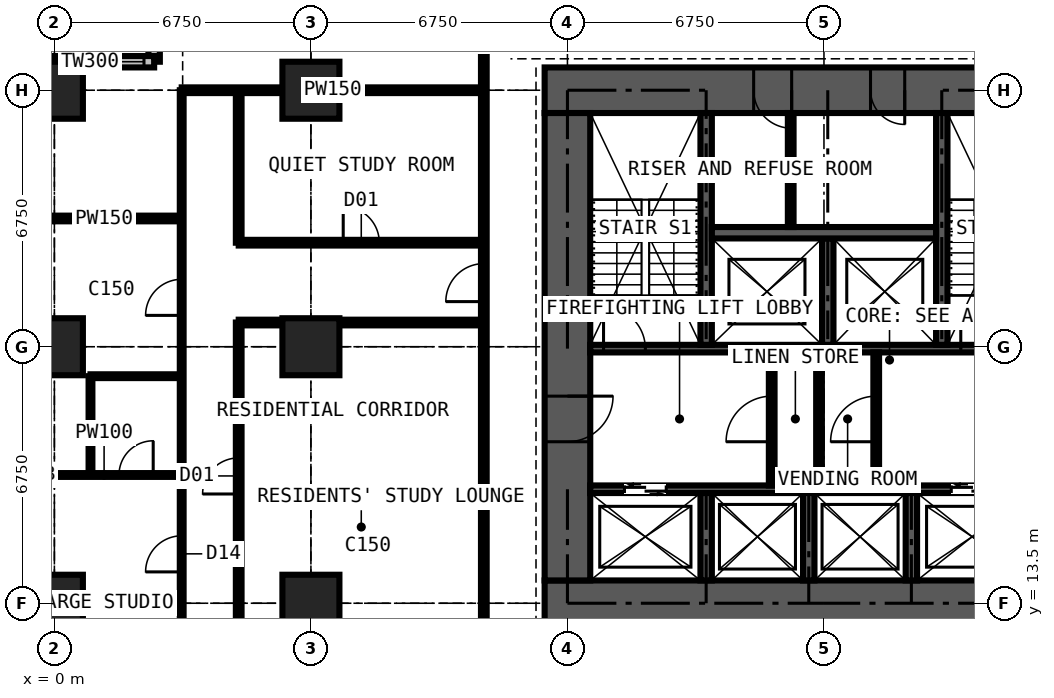
"""IFC4 building model, lengths in metres.
Left out: names, types, materials, properties, quantities, classifications, styles, units other than length and angle.
Written with IfcOpenShell. Run it as: python <this file> out.ifc"""

import sys

from ifc_helpers import new_model, si_unit, direction, frame, frame_2d, origin, origin_2d, place, context, subcontext, project, spatial, rectangle, extrude, element, fill, save


model = new_model("IFC4")
c1 = context("Model", 3, precision=1e-05, world=origin(), true_north=direction((0.0, 1.0)))
c2 = subcontext(c1, "Body", "Model", "MODEL_VIEW")
j1 = project(units=[si_unit("LENGTHUNIT", "METRE"), si_unit("PLANEANGLEUNIT", "RADIAN")], contexts=[c1])
p1 = place(None, origin())
s1 = spatial("IfcSite", under=j1, at=p1, CompositionType="ELEMENT")
p2 = place(p1, origin())
s2 = spatial("IfcBuilding", under=s1, at=p2, CompositionType="ELEMENT")
p3 = place(p2, frame((0.0, 0.0, 119.7)))
s3 = spatial("IfcBuildingStorey", under=s2, at=p3, CompositionType="ELEMENT", Elevation=119.7)
for number, where, z_axis, x_axis in (
    (1, (0.0, 13.5, 0.0), (0.0, 0.0, 1.0), (1.0, 0.0, 0.0)),
    (2, (0.0, 20.25, 0.0), (0.0, 0.0, 1.0), (1.0, 0.0, 0.0)),
    (3, (0.0, 27.0, 0.0), (0.0, 0.0, 1.0), (1.0, 0.0, 0.0)),
    (4, (6.75, 13.5, 0.0), (0.0, 0.0, 1.0), (1.0, 0.0, 0.0)),
    (5, (6.75, 20.25, 0.0), (0.0, 0.0, 1.0), (1.0, 0.0, 0.0)),
    (6, (6.75, 27.0, 0.0), (0.0, 0.0, 1.0), (1.0, 0.0, 0.0)),
):
    element("IfcColumn", number, at=place(p3, frame(where, z_axis=z_axis, x_axis=x_axis)), inside=s3, PredefinedType="COLUMN", context=c2, shape_type="SweptSolid", body=[
        extrude(rectangle(XDim=1.5, YDim=1.5, at=origin_2d()), origin(), (0.0, 0.0, 1.0), 3.6),
    ])
p4 = place(p3, frame((12.9, 13.5, 0.0), z_axis=(0.0, 0.0, 1.0), x_axis=(1.0, 0.0, 0.0)))
e7 = element("IfcWall", 7, at=p4, inside=s3, PredefinedType="SHEAR", context=c2, shape_type="SweptSolid", body=[
    extrude(rectangle(XDim=14.7, YDim=1.2, at=frame_2d((7.35, 0.0))), origin(), (0.0, 0.0, 1.0), 3.6),
])
p5 = place(p3, frame((27.6, 27.0, 0.0), z_axis=(0.0, 0.0, 1.0), x_axis=(-1.0, 0.0, 0.0)))
e8 = element("IfcWall", 8, at=p5, inside=s3, PredefinedType="SHEAR", context=c2, shape_type="SweptSolid", body=[
    extrude(rectangle(XDim=14.7, YDim=1.2, at=frame_2d((7.35, 0.0))), origin(), (0.0, 0.0, 1.0), 3.6),
])
p6 = place(p5, frame((5.225, 0.0, 0.0)))
e9 = element("IfcOpeningElement", 9, at=p6, cuts=e8, PredefinedType="OPENING", context=c2, shape_type="SweptSolid", body=[
    extrude(rectangle(XDim=0.9, YDim=2.2, at=frame_2d((0.45, 1.1))), frame((0.0, 0.61, 0.0), z_axis=(0.0, -1.0, 0.0), x_axis=(1.0, 0.0, 0.0)), (0.0, 0.0, 1.0), 1.22),
])
p7 = place(p5, frame((8.2, 0.0, 0.0)))
e10 = element("IfcOpeningElement", 10, at=p7, cuts=e8, PredefinedType="OPENING", context=c2, shape_type="SweptSolid", body=[
    extrude(rectangle(XDim=1.0, YDim=2.2, at=frame_2d((0.5, 1.1))), frame((0.0, 0.61, 0.0), z_axis=(0.0, -1.0, 0.0), x_axis=(1.0, 0.0, 0.0)), (0.0, 0.0, 1.0), 1.22),
])
p8 = place(p3, frame((13.5, 26.4, 0.0), z_axis=(0.0, 0.0, 1.0), x_axis=(0.0, -1.0, 0.0)))
e11 = element("IfcWall", 11, at=p8, inside=s3, PredefinedType="SHEAR", context=c2, shape_type="SweptSolid", body=[
    extrude(rectangle(XDim=12.3, YDim=1.2, at=frame_2d((6.15, 0.0))), origin(), (0.0, 0.0, 1.0), 3.6),
])
p9 = place(p8, frame((7.45, 0.0, 0.0)))
e12 = element("IfcOpeningElement", 12, at=p9, cuts=e11, PredefinedType="OPENING", context=c2, shape_type="SweptSolid", body=[
    extrude(rectangle(XDim=1.2, YDim=2.2, at=frame_2d((0.6, 1.1))), frame((0.0, 0.61, 0.0), z_axis=(0.0, -1.0, 0.0), x_axis=(1.0, 0.0, 0.0)), (0.0, 0.0, 1.0), 1.22),
])
p10 = place(p3, frame((2.625, 31.125, 0.0), z_axis=(0.0, 0.0, 1.0), x_axis=(0.0, -1.0, 0.0)))
e13 = element("IfcWall", 13, at=p10, inside=s3, PredefinedType="SOLIDWALL", context=c2, shape_type="SweptSolid", body=[
    extrude(rectangle(XDim=3.375, YDim=0.3, at=frame_2d((1.688, 0.0))), origin(), (0.0, 0.0, 1.0), 3.375),
])
p11 = place(p10, frame((0.788, 0.0, 0.6)))
e14 = element("IfcOpeningElement", 14, at=p11, cuts=e13, PredefinedType="OPENING", context=c2, shape_type="SweptSolid", body=[
    extrude(rectangle(XDim=1.8, YDim=2.1, at=frame_2d((0.9, 1.05))), frame((0.0, 0.16, 0.0), z_axis=(0.0, -1.0, 0.0), x_axis=(1.0, 0.0, 0.0)), (0.0, 0.0, 1.0), 0.32),
])
p12 = place(p3, frame((2.625, 27.75, 0.0), z_axis=(0.0, 0.0, 1.0), x_axis=(-1.0, 0.0, 0.0)))
e15 = element("IfcWall", 15, at=p12, inside=s3, PredefinedType="SOLIDWALL", context=c2, shape_type="SweptSolid", body=[
    extrude(rectangle(XDim=3.375, YDim=0.3, at=frame_2d((1.688, 0.0))), origin(), (0.0, 0.0, 1.0), 3.375),
])
p13 = place(p12, frame((0.268, 0.0, 0.9)))
e16 = element("IfcOpeningElement", 16, at=p13, cuts=e15, PredefinedType="OPENING", context=c2, shape_type="SweptSolid", body=[
    extrude(rectangle(XDim=1.5, YDim=1.8, at=frame_2d((0.75, 0.9))), frame((0.0, 0.16, 0.0), z_axis=(0.0, -1.0, 0.0), x_axis=(1.0, 0.0, 0.0)), (0.0, 0.0, 1.0), 0.32),
])
p14 = place(p3, frame((14.1, 16.5, 0.0), z_axis=(0.0, 0.0, 1.0), x_axis=(1.0, 0.0, 0.0)))
e17 = element("IfcWall", 17, at=p14, inside=s3, PredefinedType="SHEAR", context=c2, shape_type="SweptSolid", body=[
    extrude(rectangle(XDim=12.3, YDim=0.2, at=frame_2d((6.15, 0.0))), origin(), (0.0, 0.0, 1.0), 3.6),
])
p15 = place(p14, frame((0.9, 0.0, 0.0)))
e18 = element("IfcOpeningElement", 18, at=p15, cuts=e17, PredefinedType="OPENING", context=c2, shape_type="SweptSolid", body=[
    extrude(rectangle(XDim=1.1, YDim=2.2, at=frame_2d((0.55, 1.1))), frame((0.0, 0.11, 0.0), z_axis=(0.0, -1.0, 0.0), x_axis=(1.0, 0.0, 0.0)), (0.0, 0.0, 1.0), 0.22),
])
p16 = place(p14, frame((9.5, 0.0, 0.0)))
e19 = element("IfcOpeningElement", 19, at=p16, cuts=e17, PredefinedType="OPENING", context=c2, shape_type="SweptSolid", body=[
    extrude(rectangle(XDim=1.1, YDim=2.2, at=frame_2d((0.55, 1.1))), frame((0.0, 0.11, 0.0), z_axis=(0.0, -1.0, 0.0), x_axis=(1.0, 0.0, 0.0)), (0.0, 0.0, 1.0), 0.22),
])
p17 = place(p3, frame((14.1, 20.2, 0.0), z_axis=(0.0, 0.0, 1.0), x_axis=(1.0, 0.0, 0.0)))
e20 = element("IfcWall", 20, at=p17, inside=s3, PredefinedType="SHEAR", context=c2, shape_type="SweptSolid", body=[
    extrude(rectangle(XDim=12.3, YDim=0.2, at=frame_2d((6.15, 0.0))), origin(), (0.0, 0.0, 1.0), 3.6),
])
p18 = place(p17, frame((0.35, 0.0, 0.0)))
e21 = element("IfcOpeningElement", 21, at=p18, cuts=e20, PredefinedType="OPENING", context=c2, shape_type="SweptSolid", body=[
    extrude(rectangle(XDim=1.1, YDim=2.2, at=frame_2d((0.55, 1.1))), frame((0.0, 0.11, 0.0), z_axis=(0.0, -1.0, 0.0), x_axis=(1.0, 0.0, 0.0)), (0.0, 0.0, 1.0), 0.22),
])
p19 = place(p17, frame((9.75, 0.0, 0.0)))
e22 = element("IfcOpeningElement", 22, at=p19, cuts=e20, PredefinedType="OPENING", context=c2, shape_type="SweptSolid", body=[
    extrude(rectangle(XDim=1.1, YDim=2.2, at=frame_2d((0.55, 1.1))), frame((0.0, 0.11, 0.0), z_axis=(0.0, -1.0, 0.0), x_axis=(1.0, 0.0, 0.0)), (0.0, 0.0, 1.0), 0.22),
])
for number, where, z_axis, x_axis in (
    (23, (17.15, 20.3, 0.0), (0.0, 0.0, 1.0), (0.0, 1.0, 0.0)),
    (24, (23.35, 20.3, 0.0), (0.0, 0.0, 1.0), (0.0, 1.0, 0.0)),
):
    element("IfcWall", number, at=place(p3, frame(where, z_axis=z_axis, x_axis=x_axis)), inside=s3, PredefinedType="SHEAR", context=c2, shape_type="SweptSolid", body=[
        extrude(rectangle(XDim=6.1, YDim=0.3, at=frame_2d((3.05, 0.0))), origin(), (0.0, 0.0, 1.0), 3.6),
    ])
p20 = place(p3, frame((20.35, 20.3, 0.0), z_axis=(0.0, 0.0, 1.0), x_axis=(0.0, 1.0, 0.0)))
e25 = element("IfcWall", 25, at=p20, inside=s3, PredefinedType="SHEAR", context=c2, shape_type="SweptSolid", body=[
    extrude(rectangle(XDim=2.8, YDim=0.3, at=frame_2d((1.4, 0.0))), origin(), (0.0, 0.0, 1.0), 3.6),
])
p21 = place(p3, frame((17.3, 23.25, 0.0), z_axis=(0.0, 0.0, 1.0), x_axis=(1.0, 0.0, 0.0)))
e26 = element("IfcWall", 26, at=p21, inside=s3, PredefinedType="SHEAR", context=c2, shape_type="SweptSolid", body=[
    extrude(rectangle(XDim=5.9, YDim=0.3, at=frame_2d((2.95, 0.0))), origin(), (0.0, 0.0, 1.0), 3.6),
])
for number, where, z_axis, x_axis in (
    (27, (17.15, 14.1, 0.0), (0.0, 0.0, 1.0), (0.0, 1.0, 0.0)),
    (28, (19.85, 14.1, 0.0), (0.0, 0.0, 1.0), (0.0, 1.0, 0.0)),
    (29, (22.55, 14.1, 0.0), (0.0, 0.0, 1.0), (0.0, 1.0, 0.0)),
):
    element("IfcWall", number, at=place(p3, frame(where, z_axis=z_axis, x_axis=x_axis)), inside=s3, PredefinedType="SHEAR", context=c2, shape_type="SweptSolid", body=[
        extrude(rectangle(XDim=2.3, YDim=0.3, at=frame_2d((1.15, 0.0))), origin(), (0.0, 0.0, 1.0), 3.6),
    ])
p22 = place(p3, frame((18.875, 16.6, 0.0), z_axis=(0.0, 0.0, 1.0), x_axis=(0.0, 1.0, 0.0)))
e30 = element("IfcWall", 30, at=p22, inside=s3, PredefinedType="PARTITIONING", context=c2, shape_type="SweptSolid", body=[
    extrude(rectangle(XDim=3.5, YDim=0.15, at=frame_2d((1.75, 0.0))), origin(), (0.0, 0.0, 1.0), 3.375),
])
p23 = place(p22, frame((1.15, 0.0, 0.0)))
e31 = element("IfcOpeningElement", 31, at=p23, cuts=e30, PredefinedType="OPENING", context=c2, shape_type="SweptSolid", body=[
    extrude(rectangle(XDim=1.2, YDim=2.2, at=frame_2d((0.6, 1.1))), frame((0.0, 0.085, 0.0), z_axis=(0.0, -1.0, 0.0), x_axis=(1.0, 0.0, 0.0)), (0.0, 0.0, 1.0), 0.17),
])
p24 = place(p3, frame((21.625, 16.6, 0.0), z_axis=(0.0, 0.0, 1.0), x_axis=(0.0, 1.0, 0.0)))
e32 = element("IfcWall", 32, at=p24, inside=s3, PredefinedType="PARTITIONING", context=c2, shape_type="SweptSolid", body=[
    extrude(rectangle(XDim=3.5, YDim=0.15, at=frame_2d((1.75, 0.0))), origin(), (0.0, 0.0, 1.0), 3.375),
])
p25 = place(p24, frame((1.15, 0.0, 0.0)))
e33 = element("IfcOpeningElement", 33, at=p25, cuts=e32, PredefinedType="OPENING", context=c2, shape_type="SweptSolid", body=[
    extrude(rectangle(XDim=1.2, YDim=2.2, at=frame_2d((0.6, 1.1))), frame((0.0, 0.085, 0.0), z_axis=(0.0, -1.0, 0.0), x_axis=(1.0, 0.0, 0.0)), (0.0, 0.0, 1.0), 0.17),
])
p26 = place(p3, frame((20.12, 16.6, 0.0), z_axis=(0.0, 0.0, 1.0), x_axis=(0.0, 1.0, 0.0)))
e34 = element("IfcWall", 34, at=p26, inside=s3, PredefinedType="PARTITIONING", context=c2, shape_type="SweptSolid", body=[
    extrude(rectangle(XDim=3.5, YDim=0.15, at=frame_2d((1.75, 0.0))), origin(), (0.0, 0.0, 1.0), 3.375),
])
p27 = place(p3, frame((19.375, 23.4, 0.0), z_axis=(0.0, 0.0, 1.0), x_axis=(0.0, 1.0, 0.0)))
e35 = element("IfcWall", 35, at=p27, inside=s3, PredefinedType="PARTITIONING", context=c2, shape_type="SweptSolid", body=[
    extrude(rectangle(XDim=3.0, YDim=0.15, at=frame_2d((1.5, 0.0))), origin(), (0.0, 0.0, 1.0), 3.375),
])
p28 = place(p3, frame((-0.734, 16.875, 0.0), z_axis=(0.0, 0.0, 1.0), x_axis=(1.0, 0.0, 0.0)))
e36 = element("IfcWall", 36, at=p28, inside=s3, PredefinedType="PARTITIONING", context=c2, shape_type="SweptSolid", body=[
    extrude(rectangle(XDim=4.084, YDim=0.1, at=frame_2d((2.042, 0.0))), origin(), (0.0, 0.0, 1.0), 3.375),
])
p29 = place(p28, frame((2.434, 0.0, 0.0)))
e37 = element("IfcOpeningElement", 37, at=p29, cuts=e36, PredefinedType="OPENING", context=c2, shape_type="SweptSolid", body=[
    extrude(rectangle(XDim=0.9, YDim=2.2, at=frame_2d((0.45, 1.1))), frame((0.0, 0.06, 0.0), z_axis=(0.0, -1.0, 0.0), x_axis=(1.0, 0.0, 0.0)), (0.0, 0.0, 1.0), 0.12),
])
p30 = place(p3, frame((-0.734, 23.625, 0.0), z_axis=(0.0, 0.0, 1.0), x_axis=(1.0, 0.0, 0.0)))
e38 = element("IfcWall", 38, at=p30, inside=s3, PredefinedType="PARTITIONING", context=c2, shape_type="SweptSolid", body=[
    extrude(rectangle(XDim=4.084, YDim=0.15, at=frame_2d((2.042, 0.0))), origin(), (0.0, 0.0, 1.0), 3.375),
])
p31 = place(p3, frame((0.95, 16.875, 0.0), z_axis=(0.0, 0.0, 1.0), x_axis=(0.0, 1.0, 0.0)))
e39 = element("IfcWall", 39, at=p31, inside=s3, PredefinedType="PARTITIONING", context=c2, shape_type="SweptSolid", body=[
    extrude(rectangle(XDim=2.6, YDim=0.1, at=frame_2d((1.3, 0.0))), origin(), (0.0, 0.0, 1.0), 3.375),
])
p32 = place(p3, frame((0.95, 19.475, 0.0), z_axis=(0.0, 0.0, 1.0), x_axis=(1.0, 0.0, 0.0)))
e40 = element("IfcWall", 40, at=p32, inside=s3, PredefinedType="PARTITIONING", context=c2, shape_type="SweptSolid", body=[
    extrude(rectangle(XDim=2.4, YDim=0.1, at=frame_2d((1.2, 0.0))), origin(), (0.0, 0.0, 1.0), 3.375),
])
p33 = place(p3, frame((3.35, 10.125, 0.0), z_axis=(0.0, 0.0, 1.0), x_axis=(0.0, 1.0, 0.0)))
e41 = element("IfcWall", 41, at=p33, inside=s3, PredefinedType="PARTITIONING", context=c2, shape_type="SweptSolid", body=[
    extrude(rectangle(XDim=16.875, YDim=0.1, at=frame_2d((8.438, 0.0))), origin(), (0.0, 0.0, 1.0), 3.375),
])
p34 = place(p33, frame((4.2, 0.0, 0.0)))
e42 = element("IfcOpeningElement", 42, at=p34, cuts=e41, PredefinedType="OPENING", context=c2, shape_type="SweptSolid", body=[
    extrude(rectangle(XDim=0.95, YDim=2.2, at=frame_2d((0.475, 1.1))), frame((0.0, 0.06, 0.0), z_axis=(0.0, -1.0, 0.0), x_axis=(1.0, 0.0, 0.0)), (0.0, 0.0, 1.0), 0.12),
])
p35 = place(p33, frame((10.95, 0.0, 0.0)))
e43 = element("IfcOpeningElement", 43, at=p35, cuts=e41, PredefinedType="OPENING", context=c2, shape_type="SweptSolid", body=[
    extrude(rectangle(XDim=0.95, YDim=2.2, at=frame_2d((0.475, 1.1))), frame((0.0, 0.06, 0.0), z_axis=(0.0, -1.0, 0.0), x_axis=(1.0, 0.0, 0.0)), (0.0, 0.0, 1.0), 0.12),
])
p36 = place(p3, frame((3.35, 27.0, 0.0), z_axis=(0.0, 0.0, 1.0), x_axis=(1.0, 0.0, 0.0)))
e44 = element("IfcWall", 44, at=p36, inside=s3, PredefinedType="PARTITIONING", context=c2, shape_type="SweptSolid", body=[
    extrude(rectangle(XDim=7.95, YDim=0.15, at=frame_2d((3.975, 0.0))), origin(), (0.0, 0.0, 1.0), 2.806),
])
p37 = place(p3, frame((4.85, 12.775, 0.0), z_axis=(0.0, 0.0, 1.0), x_axis=(0.0, 1.0, 0.0)))
e45 = element("IfcWall", 45, at=p37, inside=s3, PredefinedType="PARTITIONING", context=c2, shape_type="SweptSolid", body=[
    extrude(rectangle(XDim=8.113, YDim=0.15, at=frame_2d((4.056, 0.0))), origin(), (0.0, 0.0, 1.0), 3.375),
])
p38 = place(p37, frame((3.6, 0.0, 0.0)))
e46 = element("IfcOpeningElement", 46, at=p38, cuts=e45, PredefinedType="OPENING", context=c2, shape_type="SweptSolid", body=[
    extrude(rectangle(XDim=0.95, YDim=2.2, at=frame_2d((0.475, 1.1))), frame((0.0, 0.085, 0.0), z_axis=(0.0, -1.0, 0.0), x_axis=(1.0, 0.0, 0.0)), (0.0, 0.0, 1.0), 0.17),
])
p39 = place(p3, frame((4.85, 20.887, 0.0), z_axis=(0.0, 0.0, 1.0), x_axis=(1.0, 0.0, 0.0)))
e47 = element("IfcWall", 47, at=p39, inside=s3, PredefinedType="PARTITIONING", context=c2, shape_type="SweptSolid", body=[
    extrude(rectangle(XDim=6.45, YDim=0.15, at=frame_2d((3.225, 0.0))), origin(), (0.0, 0.0, 1.0), 3.375),
])
p40 = place(p3, frame((4.85, 22.988, 0.0), z_axis=(0.0, 0.0, 1.0), x_axis=(0.0, 1.0, 0.0)))
e48 = element("IfcWall", 48, at=p40, inside=s3, PredefinedType="PARTITIONING", context=c2, shape_type="SweptSolid", body=[
    extrude(rectangle(XDim=4.012, YDim=0.15, at=frame_2d((2.006, 0.0))), origin(), (0.0, 0.0, 1.0), 3.375),
])
p41 = place(p3, frame((4.85, 22.988, 0.0), z_axis=(0.0, 0.0, 1.0), x_axis=(1.0, 0.0, 0.0)))
e49 = element("IfcWall", 49, at=p41, inside=s3, PredefinedType="PARTITIONING", context=c2, shape_type="SweptSolid", body=[
    extrude(rectangle(XDim=6.45, YDim=0.15, at=frame_2d((3.225, 0.0))), origin(), (0.0, 0.0, 1.0), 3.375),
])
p42 = place(p41, frame((2.75, 0.0, 0.0)))
e50 = element("IfcOpeningElement", 50, at=p42, cuts=e49, PredefinedType="OPENING", context=c2, shape_type="SweptSolid", body=[
    extrude(rectangle(XDim=0.95, YDim=2.2, at=frame_2d((0.475, 1.1))), frame((0.0, 0.085, 0.0), z_axis=(0.0, -1.0, 0.0), x_axis=(1.0, 0.0, 0.0)), (0.0, 0.0, 1.0), 0.17),
])
p43 = place(p3, frame((11.3, 11.3, 0.0), z_axis=(0.0, 0.0, 1.0), x_axis=(0.0, 1.0, 0.0)))
e51 = element("IfcWall", 51, at=p43, inside=s3, PredefinedType="PARTITIONING", context=c2, shape_type="SweptSolid", body=[
    extrude(rectangle(XDim=19.3, YDim=0.15, at=frame_2d((9.65, 0.0))), origin(), (0.0, 0.0, 1.0), 3.375),
])
p44 = place(p43, frame((18.1, 0.0, 0.0)))
e52 = element("IfcOpeningElement", 52, at=p44, cuts=e51, PredefinedType="OPENING", context=c2, shape_type="SweptSolid", body=[
    extrude(rectangle(XDim=1.0, YDim=2.2, at=frame_2d((0.5, 1.1))), frame((0.0, 0.085, 0.0), z_axis=(0.0, -1.0, 0.0), x_axis=(1.0, 0.0, 0.0)), (0.0, 0.0, 1.0), 0.17),
])
p45 = place(p43, frame((10.137, 0.0, 0.0)))
e53 = element("IfcOpeningElement", 53, at=p45, cuts=e51, PredefinedType="OPENING", context=c2, shape_type="SweptSolid", body=[
    extrude(rectangle(XDim=1.0, YDim=2.2, at=frame_2d((0.5, 1.1))), frame((0.0, 0.085, 0.0), z_axis=(0.0, -1.0, 0.0), x_axis=(1.0, 0.0, 0.0)), (0.0, 0.0, 1.0), 0.17),
])
p46 = place(p13, origin())
e54 = element("IfcWindow", 54, at=p46, inside=s3, PartitioningType="SINGLE_PANEL", PredefinedType="WINDOW", context=c2, shape_type="SweptSolid", body=[
    extrude(rectangle(XDim=1.5, YDim=1.8, at=frame_2d((0.75, 0.9))), frame((0.0, 0.03, 0.0), z_axis=(0.0, -1.0, 0.0), x_axis=(1.0, 0.0, 0.0)), (0.0, 0.0, 1.0), 0.06),
])
fill(e16, e54)
p47 = place(p15, origin())
e55 = element("IfcDoor", 55, at=p47, inside=s3, OperationType="DOUBLE_DOOR_SLIDING", PredefinedType="DOOR", context=c2, shape_type="SweptSolid", body=[
    extrude(rectangle(XDim=1.1, YDim=2.2, at=frame_2d((0.55, 1.1))), frame((0.0, 0.025, 0.0), z_axis=(0.0, -1.0, 0.0), x_axis=(1.0, 0.0, 0.0)), (0.0, 0.0, 1.0), 0.05),
])
fill(e18, e55)
p48 = place(p16, origin())
e56 = element("IfcDoor", 56, at=p48, inside=s3, OperationType="DOUBLE_DOOR_SLIDING", PredefinedType="DOOR", context=c2, shape_type="SweptSolid", body=[
    extrude(rectangle(XDim=1.1, YDim=2.2, at=frame_2d((0.55, 1.1))), frame((0.0, 0.025, 0.0), z_axis=(0.0, -1.0, 0.0), x_axis=(1.0, 0.0, 0.0)), (0.0, 0.0, 1.0), 0.05),
])
fill(e19, e56)
p49 = place(p9, origin())
e57 = element("IfcDoor", 57, at=p49, inside=s3, OperationType="DOUBLE_DOOR_SINGLE_SWING", PredefinedType="DOOR", context=c2, shape_type="SweptSolid", body=[
    extrude(rectangle(XDim=1.2, YDim=2.2, at=frame_2d((0.6, 1.1))), frame((0.0, 0.025, 0.0), z_axis=(0.0, -1.0, 0.0), x_axis=(1.0, 0.0, 0.0)), (0.0, 0.0, 1.0), 0.05),
])
fill(e12, e57)
p50 = place(p23, origin())
e58 = element("IfcDoor", 58, at=p50, inside=s3, OperationType="DOUBLE_DOOR_SINGLE_SWING", PredefinedType="DOOR", context=c2, shape_type="SweptSolid", body=[
    extrude(rectangle(XDim=1.2, YDim=2.2, at=frame_2d((0.6, 1.1))), frame((0.0, 0.025, 0.0), z_axis=(0.0, -1.0, 0.0), x_axis=(1.0, 0.0, 0.0)), (0.0, 0.0, 1.0), 0.05),
])
fill(e31, e58)
p51 = place(p25, origin())
e59 = element("IfcDoor", 59, at=p51, inside=s3, OperationType="DOUBLE_DOOR_SINGLE_SWING", PredefinedType="DOOR", context=c2, shape_type="SweptSolid", body=[
    extrude(rectangle(XDim=1.2, YDim=2.2, at=frame_2d((0.6, 1.1))), frame((0.0, 0.025, 0.0), z_axis=(0.0, -1.0, 0.0), x_axis=(1.0, 0.0, 0.0)), (0.0, 0.0, 1.0), 0.05),
])
fill(e33, e59)
p52 = place(p6, origin())
e60 = element("IfcDoor", 60, at=p52, inside=s3, OperationType="SINGLE_SWING_LEFT", PredefinedType="DOOR", context=c2, shape_type="SweptSolid", body=[
    extrude(rectangle(XDim=0.9, YDim=2.2, at=frame_2d((0.45, 1.1))), frame((0.0, 0.4, 0.0), z_axis=(0.0, -1.0, 0.0), x_axis=(1.0, 0.0, 0.0)), (0.0, 0.0, 1.0), 0.8),
])
fill(e9, e60)
p53 = place(p7, origin())
e61 = element("IfcDoor", 61, at=p53, inside=s3, OperationType="SINGLE_SWING_LEFT", PredefinedType="DOOR", context=c2, shape_type="SweptSolid", body=[
    extrude(rectangle(XDim=1.0, YDim=2.2, at=frame_2d((0.5, 1.1))), frame((0.0, 0.025, 0.0), z_axis=(0.0, -1.0, 0.0), x_axis=(1.0, 0.0, 0.0)), (0.0, 0.0, 1.0), 0.05),
])
fill(e10, e61)
p54 = place(p18, origin())
e62 = element("IfcDoor", 62, at=p54, inside=s3, OperationType="SINGLE_SWING_LEFT", PredefinedType="DOOR", context=c2, shape_type="SweptSolid", body=[
    extrude(rectangle(XDim=1.1, YDim=2.2, at=frame_2d((0.55, 1.1))), frame((0.0, 0.025, 0.0), z_axis=(0.0, -1.0, 0.0), x_axis=(1.0, 0.0, 0.0)), (0.0, 0.0, 1.0), 0.05),
])
fill(e21, e62)
p55 = place(p19, origin())
e63 = element("IfcDoor", 63, at=p55, inside=s3, OperationType="SINGLE_SWING_LEFT", PredefinedType="DOOR", context=c2, shape_type="SweptSolid", body=[
    extrude(rectangle(XDim=1.1, YDim=2.2, at=frame_2d((0.55, 1.1))), frame((0.0, 0.025, 0.0), z_axis=(0.0, -1.0, 0.0), x_axis=(1.0, 0.0, 0.0)), (0.0, 0.0, 1.0), 0.05),
])
fill(e22, e63)
p56 = place(p34, origin())
e64 = element("IfcDoor", 64, at=p56, inside=s3, OperationType="SINGLE_SWING_LEFT", PredefinedType="DOOR", context=c2, shape_type="SweptSolid", body=[
    extrude(rectangle(XDim=0.95, YDim=2.2, at=frame_2d((0.475, 1.1))), frame((0.0, 0.025, 0.0), z_axis=(0.0, -1.0, 0.0), x_axis=(1.0, 0.0, 0.0)), (0.0, 0.0, 1.0), 0.05),
])
fill(e42, e64)
p57 = place(p35, origin())
e65 = element("IfcDoor", 65, at=p57, inside=s3, OperationType="SINGLE_SWING_LEFT", PredefinedType="DOOR", context=c2, shape_type="SweptSolid", body=[
    extrude(rectangle(XDim=0.95, YDim=2.2, at=frame_2d((0.475, 1.1))), frame((0.0, 0.025, 0.0), z_axis=(0.0, -1.0, 0.0), x_axis=(1.0, 0.0, 0.0)), (0.0, 0.0, 1.0), 0.05),
])
fill(e43, e65)
p58 = place(p29, origin())
e66 = element("IfcDoor", 66, at=p58, inside=s3, OperationType="SINGLE_SWING_RIGHT", PredefinedType="DOOR", context=c2, shape_type="SweptSolid", body=[
    extrude(rectangle(XDim=0.9, YDim=2.2, at=frame_2d((0.45, 1.1))), frame((0.0, 0.025, 0.0), z_axis=(0.0, -1.0, 0.0), x_axis=(1.0, 0.0, 0.0)), (0.0, 0.0, 1.0), 0.05),
])
fill(e37, e66)
p59 = place(p45, origin())
e67 = element("IfcDoor", 67, at=p59, inside=s3, OperationType="SINGLE_SWING_LEFT", PredefinedType="DOOR", context=c2, shape_type="SweptSolid", body=[
    extrude(rectangle(XDim=1.0, YDim=2.2, at=frame_2d((0.5, 1.1))), frame((0.0, 0.025, 0.0), z_axis=(0.0, -1.0, 0.0), x_axis=(1.0, 0.0, 0.0)), (0.0, 0.0, 1.0), 0.05),
])
fill(e53, e67)
p60 = place(p38, origin())
e68 = element("IfcDoor", 68, at=p60, inside=s3, OperationType="SINGLE_SWING_LEFT", PredefinedType="DOOR", context=c2, shape_type="SweptSolid", body=[
    extrude(rectangle(XDim=0.95, YDim=2.2, at=frame_2d((0.475, 1.1))), frame((0.0, 0.025, 0.0), z_axis=(0.0, -1.0, 0.0), x_axis=(1.0, 0.0, 0.0)), (0.0, 0.0, 1.0), 0.05),
])
fill(e46, e68)
p61 = place(p42, origin())
e69 = element("IfcDoor", 69, at=p61, inside=s3, OperationType="SINGLE_SWING_LEFT", PredefinedType="DOOR", context=c2, shape_type="SweptSolid", body=[
    extrude(rectangle(XDim=0.95, YDim=2.2, at=frame_2d((0.475, 1.1))), frame((0.0, 0.025, 0.0), z_axis=(0.0, -1.0, 0.0), x_axis=(1.0, 0.0, 0.0)), (0.0, 0.0, 1.0), 0.05),
])
fill(e50, e69)
save(model, sys.argv[1])
